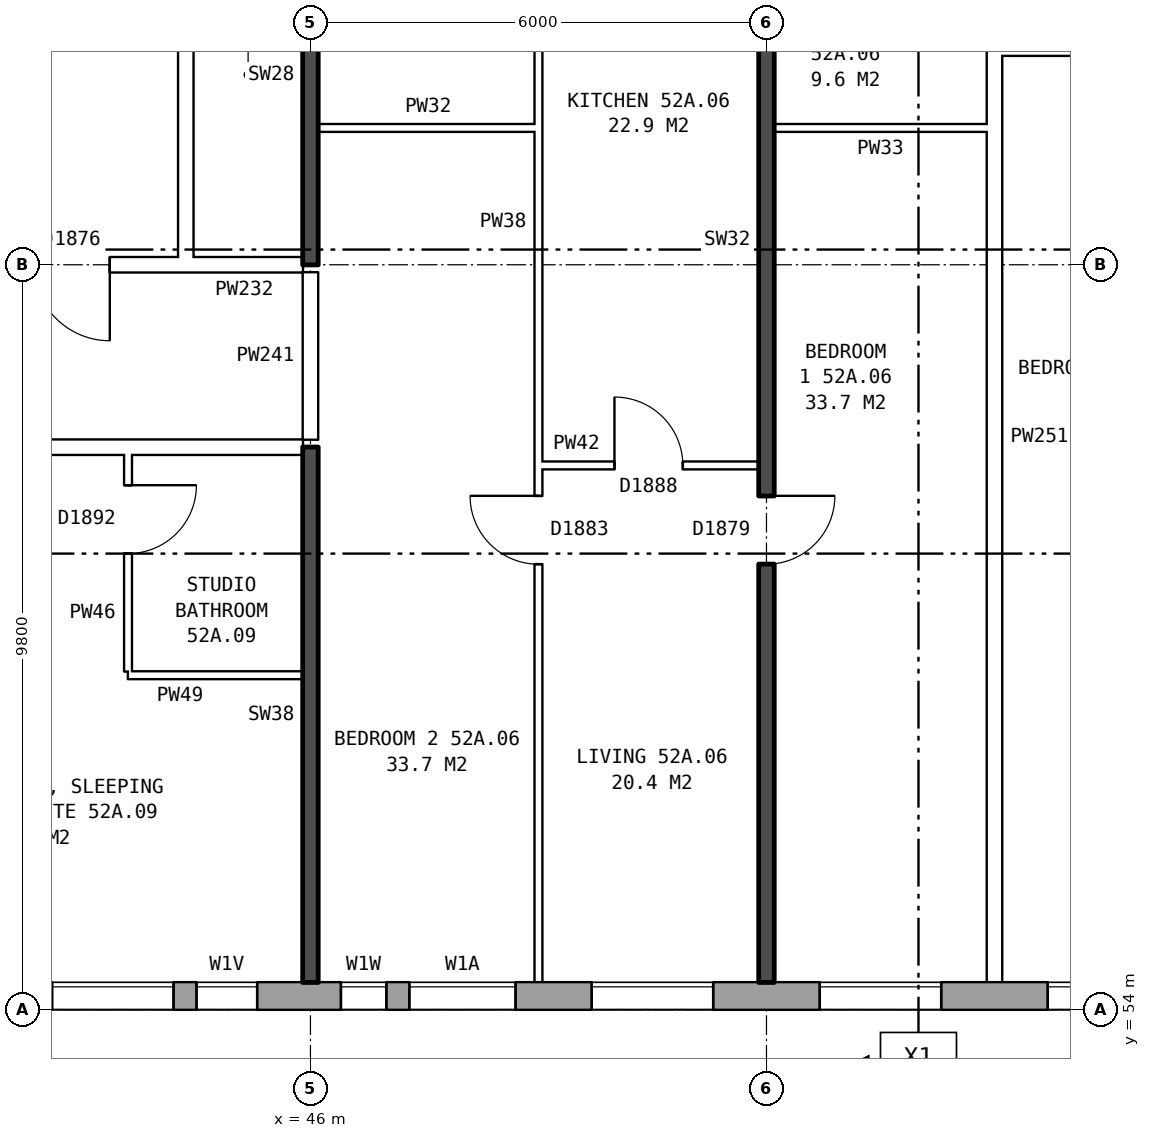
"""IFC4 building model, lengths in metres.
Left out: names, types, materials, properties, quantities, classifications, styles, units other than length and angle.
Written with IfcOpenShell. Run it as: python <this file> out.ifc"""

import sys

from ifc_helpers import new_model, si_unit, direction, frame, frame_2d, origin, place, context, subcontext, project, spatial, rectangle, extrude, element, fill, save


model = new_model("IFC4")
c1 = context("Model", 3, precision=1e-05, world=origin(), true_north=direction((0.0, 1.0)))
c2 = subcontext(c1, "Body", "Model", "MODEL_VIEW")
j1 = project(units=[si_unit("LENGTHUNIT", "METRE"), si_unit("PLANEANGLEUNIT", "RADIAN")], contexts=[c1])
p1 = place(None, origin())
s1 = spatial("IfcSite", under=j1, at=p1, CompositionType="ELEMENT")
p2 = place(p1, origin())
s2 = spatial("IfcBuilding", under=s1, at=p2, CompositionType="ELEMENT")
p3 = place(p2, frame((0.0, 0.0, 185.1)))
s3 = spatial("IfcBuildingStorey", under=s2, at=p3, CompositionType="ELEMENT", Elevation=185.1)
p4 = place(p3, frame((33.325, 54.18, 0.0), z_axis=(0.0, 0.0, 1.0), x_axis=(1.0, 0.0, 0.0)))
e1 = element("IfcWall", 1, at=p4, inside=s3, PredefinedType="STANDARD", context=c2, shape_type="SweptSolid", body=[
    extrude(rectangle(XDim=39.601, YDim=0.36, at=frame_2d((19.8, 0.0))), origin(), (0.0, 0.0, 1.0), 2.85),
])
p5 = place(p4, frame((1.375, 0.0, 0.8)))
e2 = element("IfcOpeningElement", 2, at=p5, cuts=e1, PredefinedType="OPENING", context=c2, shape_type="SweptSolid", body=[
    extrude(rectangle(XDim=1.6, YDim=1.8, at=frame_2d((0.8, 0.9))), frame((0.0, 0.19, 0.0), z_axis=(0.0, -1.0, 0.0), x_axis=(1.0, 0.0, 0.0)), (0.0, 0.0, 1.0), 0.38),
])
p6 = place(p4, frame((4.375, 0.0, 0.8)))
e3 = element("IfcOpeningElement", 3, at=p6, cuts=e1, PredefinedType="OPENING", context=c2, shape_type="SweptSolid", body=[
    extrude(rectangle(XDim=1.6, YDim=1.8, at=frame_2d((0.8, 0.9))), frame((0.0, 0.19, 0.0), z_axis=(0.0, -1.0, 0.0), x_axis=(1.0, 0.0, 0.0)), (0.0, 0.0, 1.0), 0.38),
])
p7 = place(p4, frame((7.375, 0.0, 0.8)))
e4 = element("IfcOpeningElement", 4, at=p7, cuts=e1, PredefinedType="OPENING", context=c2, shape_type="SweptSolid", body=[
    extrude(rectangle(XDim=1.6, YDim=1.8, at=frame_2d((0.8, 0.9))), frame((0.0, 0.19, 0.0), z_axis=(0.0, -1.0, 0.0), x_axis=(1.0, 0.0, 0.0)), (0.0, 0.0, 1.0), 0.38),
])
p8 = place(p4, frame((9.275, 0.0, 0.8)))
e5 = element("IfcOpeningElement", 5, at=p8, cuts=e1, PredefinedType="OPENING", context=c2, shape_type="SweptSolid", body=[
    extrude(rectangle(XDim=1.6, YDim=1.8, at=frame_2d((0.8, 0.9))), frame((0.0, 0.19, 0.0), z_axis=(0.0, -1.0, 0.0), x_axis=(1.0, 0.0, 0.0)), (0.0, 0.0, 1.0), 0.38),
])
p9 = place(p4, frame((13.075, 0.0, 0.8)))
e6 = element("IfcOpeningElement", 6, at=p9, cuts=e1, PredefinedType="OPENING", context=c2, shape_type="SweptSolid", body=[
    extrude(rectangle(XDim=0.6, YDim=0.9, at=frame_2d((0.3, 0.45))), frame((0.0, 0.19, 0.0), z_axis=(0.0, -1.0, 0.0), x_axis=(1.0, 0.0, 0.0)), (0.0, 0.0, 1.0), 0.38),
])
p10 = place(p4, frame((16.375, 0.0, 0.8)))
e7 = element("IfcOpeningElement", 7, at=p10, cuts=e1, PredefinedType="OPENING", context=c2, shape_type="SweptSolid", body=[
    extrude(rectangle(XDim=1.6, YDim=1.8, at=frame_2d((0.8, 0.9))), frame((0.0, 0.19, 0.0), z_axis=(0.0, -1.0, 0.0), x_axis=(1.0, 0.0, 0.0)), (0.0, 0.0, 1.0), 0.38),
])
p11 = place(p4, frame((19.375, 0.0, 0.8)))
e8 = element("IfcOpeningElement", 8, at=p11, cuts=e1, PredefinedType="OPENING", context=c2, shape_type="SweptSolid", body=[
    extrude(rectangle(XDim=1.6, YDim=1.8, at=frame_2d((0.8, 0.9))), frame((0.0, 0.19, 0.0), z_axis=(0.0, -1.0, 0.0), x_axis=(1.0, 0.0, 0.0)), (0.0, 0.0, 1.0), 0.38),
])
p12 = place(p4, frame((22.375, 0.0, 0.8)))
e9 = element("IfcOpeningElement", 9, at=p12, cuts=e1, PredefinedType="OPENING", context=c2, shape_type="SweptSolid", body=[
    extrude(rectangle(XDim=1.6, YDim=1.8, at=frame_2d((0.8, 0.9))), frame((0.0, 0.19, 0.0), z_axis=(0.0, -1.0, 0.0), x_axis=(1.0, 0.0, 0.0)), (0.0, 0.0, 1.0), 0.38),
])
p13 = place(p4, frame((24.875, 0.0, 0.75)))
e10 = element("IfcOpeningElement", 10, at=p13, cuts=e1, PredefinedType="OPENING", context=c2, shape_type="SweptSolid", body=[
    extrude(rectangle(XDim=0.8, YDim=1.8, at=frame_2d((0.4, 0.9))), frame((0.0, 0.19, 0.0), z_axis=(0.0, -1.0, 0.0), x_axis=(1.0, 0.0, 0.0)), (0.0, 0.0, 1.0), 0.38),
])
p14 = place(p4, frame((28.375, 0.0, 0.8)))
e11 = element("IfcOpeningElement", 11, at=p14, cuts=e1, PredefinedType="OPENING", context=c2, shape_type="SweptSolid", body=[
    extrude(rectangle(XDim=1.6, YDim=1.8, at=frame_2d((0.8, 0.9))), frame((0.0, 0.19, 0.0), z_axis=(0.0, -1.0, 0.0), x_axis=(1.0, 0.0, 0.0)), (0.0, 0.0, 1.0), 0.38),
])
p15 = place(p4, frame((31.375, 0.0, 0.8)))
e12 = element("IfcOpeningElement", 12, at=p15, cuts=e1, PredefinedType="OPENING", context=c2, shape_type="SweptSolid", body=[
    extrude(rectangle(XDim=1.6, YDim=1.8, at=frame_2d((0.8, 0.9))), frame((0.0, 0.19, 0.0), z_axis=(0.0, -1.0, 0.0), x_axis=(1.0, 0.0, 0.0)), (0.0, 0.0, 1.0), 0.38),
])
p16 = place(p4, frame((34.375, 0.0, 0.8)))
e13 = element("IfcOpeningElement", 13, at=p16, cuts=e1, PredefinedType="OPENING", context=c2, shape_type="SweptSolid", body=[
    extrude(rectangle(XDim=1.6, YDim=1.8, at=frame_2d((0.8, 0.9))), frame((0.0, 0.19, 0.0), z_axis=(0.0, -1.0, 0.0), x_axis=(1.0, 0.0, 0.0)), (0.0, 0.0, 1.0), 0.38),
])
p17 = place(p4, frame((37.375, 0.0, 0.8)))
e14 = element("IfcOpeningElement", 14, at=p17, cuts=e1, PredefinedType="OPENING", context=c2, shape_type="SweptSolid", body=[
    extrude(rectangle(XDim=1.6, YDim=1.8, at=frame_2d((0.8, 0.9))), frame((0.0, 0.19, 0.0), z_axis=(0.0, -1.0, 0.0), x_axis=(1.0, 0.0, 0.0)), (0.0, 0.0, 1.0), 0.38),
])
p18 = place(p4, frame((11.175, 0.0, 1.7)))
e15 = element("IfcOpeningElement", 15, at=p18, cuts=e1, PredefinedType="OPENING", context=c2, shape_type="SweptSolid", body=[
    extrude(rectangle(XDim=0.8, YDim=0.9, at=frame_2d((0.4, 0.45))), frame((0.0, 0.19, 0.0), z_axis=(0.0, -1.0, 0.0), x_axis=(1.0, 0.0, 0.0)), (0.0, 0.0, 1.0), 0.38),
])
p19 = place(p4, frame((13.975, 0.0, 0.8)))
e16 = element("IfcOpeningElement", 16, at=p19, cuts=e1, PredefinedType="OPENING", context=c2, shape_type="SweptSolid", body=[
    extrude(rectangle(XDim=1.4, YDim=1.8, at=frame_2d((0.7, 0.9))), frame((0.0, 0.19, 0.0), z_axis=(0.0, -1.0, 0.0), x_axis=(1.0, 0.0, 0.0)), (0.0, 0.0, 1.0), 0.38),
])
p20 = place(p4, frame((25.975, 0.0, 0.55)))
e17 = element("IfcOpeningElement", 17, at=p20, cuts=e1, PredefinedType="OPENING", context=c2, shape_type="SweptSolid", body=[
    extrude(rectangle(XDim=0.8, YDim=0.9, at=frame_2d((0.4, 0.45))), frame((0.0, 0.19, 0.0), z_axis=(0.0, -1.0, 0.0), x_axis=(1.0, 0.0, 0.0)), (0.0, 0.0, 1.0), 0.38),
])
p21 = place(p3, frame((44.36, 63.9, 0.0), z_axis=(0.0, 0.0, 1.0), x_axis=(0.0, 1.0, 0.0)))
e18 = element("IfcWall", 18, at=p21, inside=s3, PredefinedType="PARTITIONING", context=c2, shape_type="SweptSolid", body=[
    extrude(rectangle(XDim=12.2, YDim=0.2, at=frame_2d((6.1, 0.0))), origin(), (0.0, 0.0, 1.0), 2.85),
])
p22 = place(p21, frame((5.1, 0.0, 0.0)))
e19 = element("IfcOpeningElement", 19, at=p22, cuts=e18, PredefinedType="OPENING", context=c2, shape_type="SweptSolid", body=[
    extrude(rectangle(XDim=2.0, YDim=2.1, at=frame_2d((1.0, 1.05))), frame((0.0, 0.11, 0.0), z_axis=(0.0, -1.0, 0.0), x_axis=(1.0, 0.0, 0.0)), (0.0, 0.0, 1.0), 0.22),
])
p23 = place(p3, frame((43.6, 58.4, 0.0), z_axis=(0.0, 0.0, 1.0), x_axis=(1.0, 0.0, 0.0)))
e20 = element("IfcWall", 20, at=p23, inside=s3, PredefinedType="PARTITIONING", context=c2, shape_type="SweptSolid", body=[
    extrude(rectangle(XDim=2.3, YDim=0.1, at=frame_2d((1.15, 0.0))), origin(), (0.0, 0.0, 1.0), 2.85),
])
p24 = place(p3, frame((49.0, 61.16, 0.0), z_axis=(0.0, 0.0, 1.0), x_axis=(1.0, 0.0, 0.0)))
e21 = element("IfcWall", 21, at=p24, inside=s3, PredefinedType="PARTITIONING", context=c2, shape_type="SweptSolid", body=[
    extrude(rectangle(XDim=2.9, YDim=0.1, at=frame_2d((1.45, 0.0))), origin(), (0.0, 0.0, 1.0), 2.85),
])
p25 = place(p24, frame((1.0, 0.0, 0.0)))
e22 = element("IfcOpeningElement", 22, at=p25, cuts=e21, PredefinedType="OPENING", context=c2, shape_type="SweptSolid", body=[
    extrude(rectangle(XDim=0.9, YDim=2.1, at=frame_2d((0.45, 1.05))), frame((0.0, 0.06, 0.0), z_axis=(0.0, -1.0, 0.0), x_axis=(1.0, 0.0, 0.0)), (0.0, 0.0, 1.0), 0.12),
])
p26 = place(p3, frame((30.61, 61.4, 0.0), z_axis=(0.0, 0.0, 1.0), x_axis=(1.0, 0.0, 0.0)))
e23 = element("IfcWall", 23, at=p26, inside=s3, PredefinedType="PARTITIONING", context=c2, shape_type="SweptSolid", body=[
    extrude(rectangle(XDim=15.29, YDim=0.2, at=frame_2d((7.645, 0.0))), origin(), (0.0, 0.0, 1.0), 2.85),
])
p27 = place(p26, frame((10.69, 0.0, 0.0)))
e24 = element("IfcOpeningElement", 24, at=p27, cuts=e23, PredefinedType="OPENING", context=c2, shape_type="SweptSolid", body=[
    extrude(rectangle(XDim=1.0, YDim=2.1, at=frame_2d((0.5, 1.05))), frame((0.0, 0.11, 0.0), z_axis=(0.0, -1.0, 0.0), x_axis=(1.0, 0.0, 0.0)), (0.0, 0.0, 1.0), 0.22),
])
p28 = place(p26, frame((5.89, 0.0, 0.0)))
e25 = element("IfcOpeningElement", 25, at=p28, cuts=e23, PredefinedType="OPENING", context=c2, shape_type="SweptSolid", body=[
    extrude(rectangle(XDim=1.0, YDim=2.1, at=frame_2d((0.5, 1.05))), frame((0.0, 0.11, 0.0), z_axis=(0.0, -1.0, 0.0), x_axis=(1.0, 0.0, 0.0)), (0.0, 0.0, 1.0), 0.22),
])
p29 = place(p3, frame((41.36, 63.8, 0.0), z_axis=(0.0, 0.0, 1.0), x_axis=(1.0, 0.0, 0.0)))
e26 = element("IfcWall", 26, at=p29, inside=s3, PredefinedType="PARTITIONING", context=c2, shape_type="SweptSolid", body=[
    extrude(rectangle(XDim=3.0, YDim=0.2, at=frame_2d((1.5, 0.0))), origin(), (0.0, 0.0, 1.0), 2.85),
])
p30 = place(p29, frame((1.0, 0.0, 0.0)))
e27 = element("IfcOpeningElement", 27, at=p30, cuts=e26, PredefinedType="OPENING", context=c2, shape_type="SweptSolid", body=[
    extrude(rectangle(XDim=1.0, YDim=2.1, at=frame_2d((0.5, 1.05))), frame((0.0, 0.11, 0.0), z_axis=(0.0, -1.0, 0.0), x_axis=(1.0, 0.0, 0.0)), (0.0, 0.0, 1.0), 0.22),
])
p31 = place(p3, frame((44.36, 63.8, 0.0), z_axis=(0.0, 0.0, 1.0), x_axis=(1.0, 0.0, 0.0)))
e28 = element("IfcWall", 28, at=p31, inside=s3, PredefinedType="PARTITIONING", context=c2, shape_type="SweptSolid", body=[
    extrude(rectangle(XDim=1.54, YDim=0.2, at=frame_2d((0.77, 0.0))), origin(), (0.0, 0.0, 1.0), 2.85),
])
p32 = place(p3, frame((46.1, 65.6, 0.0), z_axis=(0.0, 0.0, 1.0), x_axis=(1.0, 0.0, 0.0)))
e29 = element("IfcWall", 29, at=p32, inside=s3, PredefinedType="PARTITIONING", context=c2, shape_type="SweptSolid", body=[
    extrude(rectangle(XDim=2.9, YDim=0.1, at=frame_2d((1.45, 0.0))), origin(), (0.0, 0.0, 1.0), 2.85),
])
for number, where, z_axis, x_axis in (
    (30, (52.1, 65.6, 0.0), (0.0, 0.0, 1.0), (1.0, 0.0, 0.0)),
    (31, (55.1, 66.6, 0.0), (0.0, 0.0, 1.0), (1.0, 0.0, 0.0)),
):
    element("IfcWall", number, at=place(p3, frame(where, z_axis=z_axis, x_axis=x_axis)), inside=s3, PredefinedType="PARTITIONING", context=c2, shape_type="SweptSolid", body=[
        extrude(rectangle(XDim=2.8, YDim=0.1, at=frame_2d((1.4, 0.0))), origin(), (0.0, 0.0, 1.0), 2.85),
    ])
p33 = place(p3, frame((43.6, 58.45, 0.0), z_axis=(0.0, 0.0, 1.0), x_axis=(0.0, 1.0, 0.0)))
e32 = element("IfcWall", 32, at=p33, inside=s3, PredefinedType="PARTITIONING", context=c2, shape_type="SweptSolid", body=[
    extrude(rectangle(XDim=2.85, YDim=0.1, at=frame_2d((1.425, 0.0))), origin(), (0.0, 0.0, 1.0), 2.85),
])
p34 = place(p33, frame((1.55, 0.0, 0.0)))
e33 = element("IfcOpeningElement", 33, at=p34, cuts=e32, PredefinedType="OPENING", context=c2, shape_type="SweptSolid", body=[
    extrude(rectangle(XDim=0.9, YDim=2.1, at=frame_2d((0.45, 1.05))), frame((0.0, 0.06, 0.0), z_axis=(0.0, -1.0, 0.0), x_axis=(1.0, 0.0, 0.0)), (0.0, 0.0, 1.0), 0.12),
])
p35 = place(p3, frame((46.0, 54.36, 0.0), z_axis=(0.0, 0.0, 1.0), x_axis=(0.0, 1.0, 0.0)))
e34 = element("IfcWall", 34, at=p35, inside=s3, PredefinedType="SOLIDWALL", context=c2, shape_type="SweptSolid", body=[
    extrude(rectangle(XDim=7.04, YDim=0.2, at=frame_2d((3.52, 0.0))), origin(), (0.0, 0.0, 1.0), 2.85),
])
p36 = place(p3, frame((46.0, 61.5, 0.0), z_axis=(0.0, 0.0, 1.0), x_axis=(0.0, 1.0, 0.0)))
e35 = element("IfcWall", 35, at=p36, inside=s3, PredefinedType="PARTITIONING", context=c2, shape_type="SweptSolid", body=[
    extrude(rectangle(XDim=2.2, YDim=0.2, at=frame_2d((1.1, 0.0))), origin(), (0.0, 0.0, 1.0), 2.85),
])
p37 = place(p3, frame((46.0, 63.8, 0.0), z_axis=(0.0, 0.0, 1.0), x_axis=(0.0, 1.0, 0.0)))
e36 = element("IfcWall", 36, at=p37, inside=s3, PredefinedType="SOLIDWALL", context=c2, shape_type="SweptSolid", body=[
    extrude(rectangle(XDim=5.0, YDim=0.2, at=frame_2d((2.5, 0.0))), origin(), (0.0, 0.0, 1.0), 2.85),
])
p38 = place(p3, frame((49.0, 54.36, 0.0), z_axis=(0.0, 0.0, 1.0), x_axis=(0.0, 1.0, 0.0)))
e37 = element("IfcWall", 37, at=p38, inside=s3, PredefinedType="PARTITIONING", context=c2, shape_type="SweptSolid", body=[
    extrude(rectangle(XDim=14.34, YDim=0.1, at=frame_2d((7.17, 0.0))), origin(), (0.0, 0.0, 1.0), 2.85),
])
p39 = place(p38, frame((5.5, 0.0, 0.0)))
e38 = element("IfcOpeningElement", 38, at=p39, cuts=e37, PredefinedType="OPENING", context=c2, shape_type="SweptSolid", body=[
    extrude(rectangle(XDim=0.9, YDim=2.1, at=frame_2d((0.45, 1.05))), frame((0.0, 0.06, 0.0), z_axis=(0.0, -1.0, 0.0), x_axis=(1.0, 0.0, 0.0)), (0.0, 0.0, 1.0), 0.12),
])
p40 = place(p38, frame((13.04, 0.0, 0.0)))
e39 = element("IfcOpeningElement", 39, at=p40, cuts=e37, PredefinedType="OPENING", context=c2, shape_type="SweptSolid", body=[
    extrude(rectangle(XDim=0.9, YDim=2.1, at=frame_2d((0.45, 1.05))), frame((0.0, 0.06, 0.0), z_axis=(0.0, -1.0, 0.0), x_axis=(1.0, 0.0, 0.0)), (0.0, 0.0, 1.0), 0.12),
])
p41 = place(p3, frame((52.0, 54.36, 0.0), z_axis=(0.0, 0.0, 1.0), x_axis=(0.0, 1.0, 0.0)))
e40 = element("IfcWall", 40, at=p41, inside=s3, PredefinedType="SOLIDWALL", context=c2, shape_type="SweptSolid", body=[
    extrude(rectangle(XDim=14.44, YDim=0.2, at=frame_2d((7.22, 0.0))), origin(), (0.0, 0.0, 1.0), 2.85),
])
p42 = place(p41, frame((5.5, 0.0, 0.0)))
e41 = element("IfcOpeningElement", 41, at=p42, cuts=e40, PredefinedType="OPENING", context=c2, shape_type="SweptSolid", body=[
    extrude(rectangle(XDim=0.9, YDim=2.1, at=frame_2d((0.45, 1.05))), frame((0.0, 0.11, 0.0), z_axis=(0.0, -1.0, 0.0), x_axis=(1.0, 0.0, 0.0)), (0.0, 0.0, 1.0), 0.22),
])
p43 = place(p41, frame((13.14, 0.0, 0.0)))
e42 = element("IfcOpeningElement", 42, at=p43, cuts=e40, PredefinedType="OPENING", context=c2, shape_type="SweptSolid", body=[
    extrude(rectangle(XDim=0.9, YDim=2.1, at=frame_2d((0.45, 1.05))), frame((0.0, 0.11, 0.0), z_axis=(0.0, -1.0, 0.0), x_axis=(1.0, 0.0, 0.0)), (0.0, 0.0, 1.0), 0.22),
])
p44 = place(p3, frame((55.0, 54.36, 0.0), z_axis=(0.0, 0.0, 1.0), x_axis=(0.0, 1.0, 0.0)))
e43 = element("IfcWall", 43, at=p44, inside=s3, PredefinedType="PARTITIONING", context=c2, shape_type="SweptSolid", body=[
    extrude(rectangle(XDim=14.34, YDim=0.2, at=frame_2d((7.17, 0.0))), origin(), (0.0, 0.0, 1.0), 2.85),
])
p45 = place(p8, origin())
e44 = element("IfcWindow", 44, at=p45, inside=s3, PartitioningType="SINGLE_PANEL", PredefinedType="WINDOW", context=c2, shape_type="SweptSolid", body=[
    extrude(rectangle(XDim=1.6, YDim=1.8, at=frame_2d((0.8, 0.9))), frame((0.0, 0.15, 0.0), z_axis=(0.0, -1.0, 0.0), x_axis=(1.0, 0.0, 0.0)), (0.0, 0.0, 1.0), 0.06),
])
fill(e5, e44)
p46 = place(p9, origin())
e45 = element("IfcWindow", 45, at=p46, inside=s3, PartitioningType="SINGLE_PANEL", PredefinedType="WINDOW", context=c2, shape_type="SweptSolid", body=[
    extrude(rectangle(XDim=0.6, YDim=0.9, at=frame_2d((0.3, 0.45))), frame((0.0, 0.15, 0.0), z_axis=(0.0, -1.0, 0.0), x_axis=(1.0, 0.0, 0.0)), (0.0, 0.0, 1.0), 0.06),
])
fill(e6, e45)
p47 = place(p10, origin())
e46 = element("IfcWindow", 46, at=p47, inside=s3, PartitioningType="SINGLE_PANEL", PredefinedType="WINDOW", context=c2, shape_type="SweptSolid", body=[
    extrude(rectangle(XDim=1.6, YDim=1.8, at=frame_2d((0.8, 0.9))), frame((0.0, 0.15, 0.0), z_axis=(0.0, -1.0, 0.0), x_axis=(1.0, 0.0, 0.0)), (0.0, 0.0, 1.0), 0.06),
])
fill(e7, e46)
p48 = place(p11, origin())
e47 = element("IfcWindow", 47, at=p48, inside=s3, PartitioningType="SINGLE_PANEL", PredefinedType="WINDOW", context=c2, shape_type="SweptSolid", body=[
    extrude(rectangle(XDim=1.6, YDim=1.8, at=frame_2d((0.8, 0.9))), frame((0.0, 0.15, 0.0), z_axis=(0.0, -1.0, 0.0), x_axis=(1.0, 0.0, 0.0)), (0.0, 0.0, 1.0), 0.06),
])
fill(e8, e47)
p49 = place(p12, origin())
e48 = element("IfcWindow", 48, at=p49, inside=s3, PartitioningType="SINGLE_PANEL", PredefinedType="WINDOW", context=c2, shape_type="SweptSolid", body=[
    extrude(rectangle(XDim=1.6, YDim=1.8, at=frame_2d((0.8, 0.9))), frame((0.0, 0.15, 0.0), z_axis=(0.0, -1.0, 0.0), x_axis=(1.0, 0.0, 0.0)), (0.0, 0.0, 1.0), 0.06),
])
fill(e9, e48)
p50 = place(p30, frame((1.0, 0.0, 0.0), z_axis=(0.0, 0.0, 1.0), x_axis=(-1.0, 0.0, 0.0)))
e49 = element("IfcDoor", 49, at=p50, inside=s3, OperationType="SINGLE_SWING_LEFT", PredefinedType="DOOR", context=c2, shape_type="SweptSolid", body=[
    extrude(rectangle(XDim=1.0, YDim=2.1, at=frame_2d((0.5, 1.05))), frame((0.0, 0.025, 0.0), z_axis=(0.0, -1.0, 0.0), x_axis=(1.0, 0.0, 0.0)), (0.0, 0.0, 1.0), 0.05),
])
fill(e27, e49)
p51 = place(p42, frame((0.9, 0.0, 0.0), z_axis=(0.0, 0.0, 1.0), x_axis=(-1.0, 0.0, 0.0)))
e50 = element("IfcDoor", 50, at=p51, inside=s3, OperationType="SINGLE_SWING_LEFT", PredefinedType="DOOR", context=c2, shape_type="SweptSolid", body=[
    extrude(rectangle(XDim=0.9, YDim=2.1, at=frame_2d((0.45, 1.05))), frame((0.0, 0.025, 0.0), z_axis=(0.0, -1.0, 0.0), x_axis=(1.0, 0.0, 0.0)), (0.0, 0.0, 1.0), 0.05),
])
fill(e41, e50)
p52 = place(p39, origin())
e51 = element("IfcDoor", 51, at=p52, inside=s3, OperationType="SINGLE_SWING_RIGHT", PredefinedType="DOOR", context=c2, shape_type="SweptSolid", body=[
    extrude(rectangle(XDim=0.9, YDim=2.1, at=frame_2d((0.45, 1.05))), frame((0.0, 0.025, 0.0), z_axis=(0.0, -1.0, 0.0), x_axis=(1.0, 0.0, 0.0)), (0.0, 0.0, 1.0), 0.05),
])
fill(e38, e51)
p53 = place(p25, origin())
e52 = element("IfcDoor", 52, at=p53, inside=s3, OperationType="SINGLE_SWING_LEFT", PredefinedType="DOOR", context=c2, shape_type="SweptSolid", body=[
    extrude(rectangle(XDim=0.9, YDim=2.1, at=frame_2d((0.45, 1.05))), frame((0.0, 0.025, 0.0), z_axis=(0.0, -1.0, 0.0), x_axis=(1.0, 0.0, 0.0)), (0.0, 0.0, 1.0), 0.05),
])
fill(e22, e52)
p54 = place(p34, frame((0.9, 0.0, 0.0), z_axis=(0.0, 0.0, 1.0), x_axis=(-1.0, 0.0, 0.0)))
e53 = element("IfcDoor", 53, at=p54, inside=s3, OperationType="SINGLE_SWING_LEFT", PredefinedType="DOOR", context=c2, shape_type="SweptSolid", body=[
    extrude(rectangle(XDim=0.9, YDim=2.1, at=frame_2d((0.45, 1.05))), frame((0.0, 0.025, 0.0), z_axis=(0.0, -1.0, 0.0), x_axis=(1.0, 0.0, 0.0)), (0.0, 0.0, 1.0), 0.05),
])
fill(e33, e53)
p55 = place(p18, origin())
e54 = element("IfcWindow", 54, at=p55, inside=s3, PartitioningType="SINGLE_PANEL", PredefinedType="WINDOW", context=c2, shape_type="SweptSolid", body=[
    extrude(rectangle(XDim=0.8, YDim=0.9, at=frame_2d((0.4, 0.45))), frame((0.0, 0.15, 0.0), z_axis=(0.0, -1.0, 0.0), x_axis=(1.0, 0.0, 0.0)), (0.0, 0.0, 1.0), 0.06),
])
fill(e15, e54)
p56 = place(p19, origin())
e55 = element("IfcWindow", 55, at=p56, inside=s3, PartitioningType="SINGLE_PANEL", PredefinedType="WINDOW", context=c2, shape_type="SweptSolid", body=[
    extrude(rectangle(XDim=1.4, YDim=1.8, at=frame_2d((0.7, 0.9))), frame((0.0, 0.15, 0.0), z_axis=(0.0, -1.0, 0.0), x_axis=(1.0, 0.0, 0.0)), (0.0, 0.0, 1.0), 0.06),
])
fill(e16, e55)
save(model, sys.argv[1])
